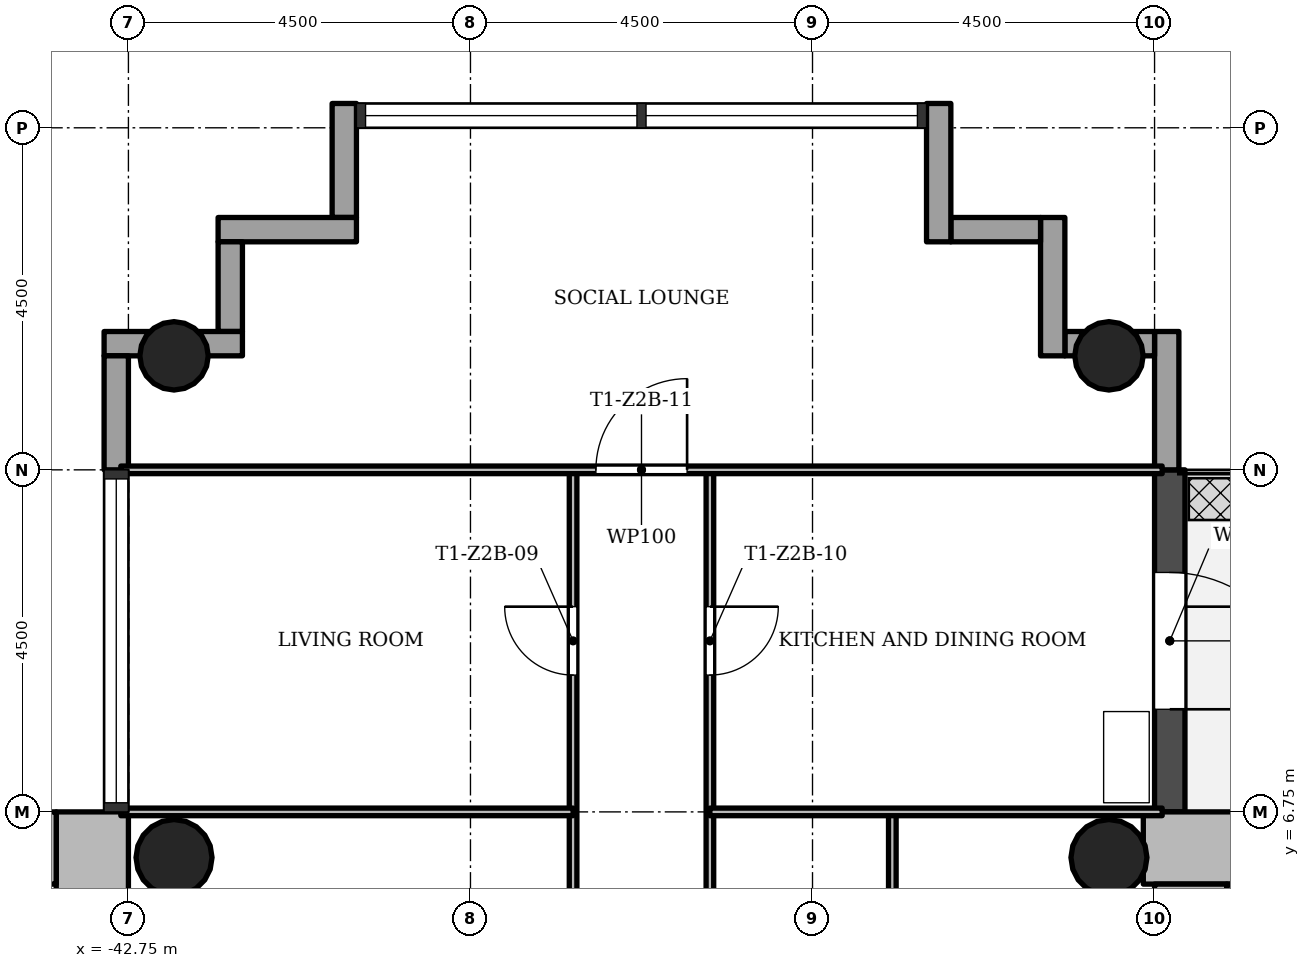
"""IFC4 building model, lengths in metres.
Left out: names, types, materials, properties, quantities, classifications, styles, units other than length and angle.
Written with IfcOpenShell. Run it as: python <this file> out.ifc"""

import sys

from ifc_helpers import new_model, si_unit, direction, frame, frame_2d, origin, origin_2d, place, context, subcontext, project, spatial, rectangle, hollow_circle, extrude, element, fill, save


model = new_model("IFC4")
c1 = context("Model", 3, precision=1e-05, world=origin(), true_north=direction((0.0, 1.0)))
c2 = subcontext(c1, "Body", "Model", "MODEL_VIEW")
j1 = project(units=[si_unit("LENGTHUNIT", "METRE"), si_unit("PLANEANGLEUNIT", "RADIAN")], contexts=[c1])
p1 = place(None, origin())
s1 = spatial("IfcSite", under=j1, at=p1, CompositionType="ELEMENT")
p2 = place(p1, origin())
s2 = spatial("IfcBuilding", under=s1, at=p2, CompositionType="ELEMENT")
p3 = place(p2, frame((0.0, 0.0, 83.4)))
s3 = spatial("IfcBuildingStorey", under=s2, at=p3, CompositionType="ELEMENT", Elevation=83.4)
p4 = place(p3, frame((-20.702, 6.275, 0.0), z_axis=(0.0, 0.0, 1.0), x_axis=(-1.0, 0.0, 0.0)))
e1 = element("IfcWall", 1, at=p4, inside=s3, PredefinedType="SHEAR", context=c2, shape_type="SweptSolid", body=[
    extrude(rectangle(XDim=8.696, YDim=0.95, at=frame_2d((4.348, 0.0))), origin(), (0.0, 0.0, 1.0), 3.4),
])
p5 = place(p3, frame((-28.775, 5.8, 0.0), z_axis=(0.0, 0.0, 1.0), x_axis=(0.0, -1.0, 0.0)))
e2 = element("IfcWall", 2, at=p5, inside=s3, PredefinedType="SHEAR", context=c2, shape_type="SweptSolid", body=[
    extrude(rectangle(XDim=12.55, YDim=0.95, at=frame_2d((6.275, 0.0))), origin(), (0.0, 0.0, 1.0), 3.4),
])
p6 = place(p5, frame((4.9, 0.0, 0.0)))
e3 = element("IfcOpeningElement", 3, at=p6, cuts=e2, PredefinedType="OPENING", context=c2, shape_type="SweptSolid", body=[
    extrude(rectangle(XDim=1.8, YDim=2.1, at=frame_2d((0.9, 1.05))), frame((0.0, 0.485, 0.0), z_axis=(0.0, -1.0, 0.0), x_axis=(1.0, 0.0, 0.0)), (0.0, 0.0, 1.0), 0.97),
])
p7 = place(p3, frame((-43.225, -5.8, 0.0), z_axis=(0.0, 0.0, 1.0), x_axis=(0.0, 1.0, 0.0)))
e4 = element("IfcWall", 4, at=p7, inside=s3, PredefinedType="SHEAR", context=c2, shape_type="SweptSolid", body=[
    extrude(rectangle(XDim=12.55, YDim=0.95, at=frame_2d((6.275, 0.0))), origin(), (0.0, 0.0, 1.0), 3.4),
])
p8 = place(p7, frame((4.9, 0.0, 0.0)))
e5 = element("IfcOpeningElement", 5, at=p8, cuts=e4, PredefinedType="OPENING", context=c2, shape_type="SweptSolid", body=[
    extrude(rectangle(XDim=1.8, YDim=2.1, at=frame_2d((0.9, 1.05))), frame((0.0, 0.485, 0.0), z_axis=(0.0, -1.0, 0.0), x_axis=(1.0, 0.0, 0.0)), (0.0, 0.0, 1.0), 0.97),
])
p9 = place(p3, frame((-43.7, 6.275, 0.0), z_axis=(0.0, 0.0, 1.0), x_axis=(-1.0, 0.0, 0.0)))
e6 = element("IfcWall", 6, at=p9, inside=s3, PredefinedType="SHEAR", context=c2, shape_type="SweptSolid", body=[
    extrude(rectangle(XDim=8.05, YDim=0.95, at=frame_2d((4.025, 0.0))), origin(), (0.0, 0.0, 1.0), 3.4),
])
for number, where, z_axis, x_axis in (
    (7, (-29.85, 12.75, 0.0), (0.0, 0.0, 1.0), (1.0, 0.0, 0.0)),
    (8, (-42.15, 12.75, 0.0), (0.0, 0.0, 1.0), (1.0, 0.0, 0.0)),
):
    element("IfcColumn", number, at=place(p3, frame(where, z_axis=z_axis, x_axis=x_axis)), inside=s3, PredefinedType="COLUMN", context=c2, shape_type="SweptSolid", body=[
        extrude(hollow_circle(Radius=0.45, WallThickness=0.032, at=origin_2d()), origin(), (0.0, 0.0, 1.0), 3.4),
    ])
for number, where, z_axis, x_axis in (
    (9, (-29.85, 6.15, 0.0), (0.0, 0.0, 1.0), (1.0, 0.0, 0.0)),
    (10, (-42.15, 6.15, 0.0), (0.0, 0.0, 1.0), (1.0, 0.0, 0.0)),
):
    element("IfcColumn", number, at=place(p3, frame(where, z_axis=z_axis, x_axis=x_axis)), inside=s3, PredefinedType="COLUMN", context=c2, shape_type="SweptSolid", body=[
        extrude(hollow_circle(Radius=0.5, WallThickness=0.036, at=origin_2d()), origin(), (0.0, 0.0, 1.0), 3.4),
    ])
p10 = place(p3, frame((-29.05, 6.75, -0.02), z_axis=(0.0, 0.0, 1.0), x_axis=(0.0, 1.0, 0.0)))
e11 = element("IfcWall", 11, at=p10, inside=s3, PredefinedType="STANDARD", context=c2, shape_type="SweptSolid", body=[
    extrude(rectangle(XDim=4.5, YDim=0.4, at=frame_2d((2.25, 0.0))), origin(), (0.0, 0.0, 1.0), 3.12),
])
p11 = place(p10, frame((1.35, 0.0, 0.02)))
e12 = element("IfcOpeningElement", 12, at=p11, cuts=e11, PredefinedType="OPENING", context=c2, shape_type="SweptSolid", body=[
    extrude(rectangle(XDim=1.8, YDim=2.1, at=frame_2d((0.9, 1.05))), frame((0.0, 0.21, 0.0), z_axis=(0.0, -1.0, 0.0), x_axis=(1.0, 0.0, 0.0)), (0.0, 0.0, 1.0), 0.42),
])
p12 = place(p3, frame((-29.09, 11.25, -0.3), z_axis=(0.0, 0.0, 1.0), x_axis=(0.0, 1.0, 0.0)))
e13 = element("IfcWall", 13, at=p12, inside=s3, PredefinedType="STANDARD", context=c2, shape_type="SweptSolid", body=[
    extrude(rectangle(XDim=1.82, YDim=0.32, at=frame_2d((0.91, 0.0))), origin(), (0.0, 0.0, 1.0), 3.4),
])
p13 = place(p3, frame((-29.25, 12.91, -0.3), z_axis=(0.0, 0.0, 1.0), x_axis=(-1.0, 0.0, 0.0)))
e14 = element("IfcWall", 14, at=p13, inside=s3, PredefinedType="STANDARD", context=c2, shape_type="SweptSolid", body=[
    extrude(rectangle(XDim=1.18, YDim=0.32, at=frame_2d((0.59, 0.0))), origin(), (0.0, 0.0, 1.0), 3.4),
])
p14 = place(p3, frame((-30.59, 12.75, -0.3), z_axis=(0.0, 0.0, 1.0), x_axis=(0.0, 1.0, 0.0)))
e15 = element("IfcWall", 15, at=p14, inside=s3, PredefinedType="STANDARD", context=c2, shape_type="SweptSolid", body=[
    extrude(rectangle(XDim=1.82, YDim=0.32, at=frame_2d((0.91, 0.0))), origin(), (0.0, 0.0, 1.0), 3.4),
])
p15 = place(p3, frame((-30.75, 14.41, -0.3), z_axis=(0.0, 0.0, 1.0), x_axis=(-1.0, 0.0, 0.0)))
e16 = element("IfcWall", 16, at=p15, inside=s3, PredefinedType="STANDARD", context=c2, shape_type="SweptSolid", body=[
    extrude(rectangle(XDim=1.18, YDim=0.32, at=frame_2d((0.59, 0.0))), origin(), (0.0, 0.0, 1.0), 3.4),
])
p16 = place(p3, frame((-32.09, 14.25, -0.3), z_axis=(0.0, 0.0, 1.0), x_axis=(0.0, 1.0, 0.0)))
e17 = element("IfcWall", 17, at=p16, inside=s3, PredefinedType="STANDARD", context=c2, shape_type="SweptSolid", body=[
    extrude(rectangle(XDim=1.82, YDim=0.32, at=frame_2d((0.91, 0.0))), origin(), (0.0, 0.0, 1.0), 3.4),
])
p17 = place(p3, frame((-39.91, 16.07, -0.3), z_axis=(0.0, 0.0, 1.0), x_axis=(0.0, -1.0, 0.0)))
e18 = element("IfcWall", 18, at=p17, inside=s3, PredefinedType="STANDARD", context=c2, shape_type="SweptSolid", body=[
    extrude(rectangle(XDim=1.5, YDim=0.32, at=frame_2d((0.75, 0.0))), origin(), (0.0, 0.0, 1.0), 3.4),
])
p18 = place(p3, frame((-39.75, 14.41, -0.3), z_axis=(0.0, 0.0, 1.0), x_axis=(-1.0, 0.0, 0.0)))
e19 = element("IfcWall", 19, at=p18, inside=s3, PredefinedType="STANDARD", context=c2, shape_type="SweptSolid", body=[
    extrude(rectangle(XDim=1.82, YDim=0.32, at=frame_2d((0.91, 0.0))), origin(), (0.0, 0.0, 1.0), 3.4),
])
p19 = place(p3, frame((-41.41, 14.25, -0.3), z_axis=(0.0, 0.0, 1.0), x_axis=(0.0, -1.0, 0.0)))
e20 = element("IfcWall", 20, at=p19, inside=s3, PredefinedType="STANDARD", context=c2, shape_type="SweptSolid", body=[
    extrude(rectangle(XDim=1.18, YDim=0.32, at=frame_2d((0.59, 0.0))), origin(), (0.0, 0.0, 1.0), 3.4),
])
p20 = place(p3, frame((-41.25, 12.91, -0.3), z_axis=(0.0, 0.0, 1.0), x_axis=(-1.0, 0.0, 0.0)))
e21 = element("IfcWall", 21, at=p20, inside=s3, PredefinedType="STANDARD", context=c2, shape_type="SweptSolid", body=[
    extrude(rectangle(XDim=1.82, YDim=0.32, at=frame_2d((0.91, 0.0))), origin(), (0.0, 0.0, 1.0), 3.4),
])
p21 = place(p3, frame((-42.91, 12.75, -0.3), z_axis=(0.0, 0.0, 1.0), x_axis=(0.0, -1.0, 0.0)))
e22 = element("IfcWall", 22, at=p21, inside=s3, PredefinedType="STANDARD", context=c2, shape_type="SweptSolid", body=[
    extrude(rectangle(XDim=1.5, YDim=0.32, at=frame_2d((0.75, 0.0))), origin(), (0.0, 0.0, 1.0), 3.4),
])
p22 = place(p3, frame((-36.9, 1.5, 0.0), z_axis=(0.0, 0.0, 1.0), x_axis=(0.0, 1.0, 0.0)))
e23 = element("IfcWall", 23, at=p22, inside=s3, PredefinedType="PARTITIONING", context=c2, shape_type="SweptSolid", body=[
    extrude(rectangle(XDim=9.75, YDim=0.1, at=frame_2d((4.875, 0.0))), origin(), (0.0, 0.0, 1.0), 3.0),
])
p23 = place(p22, frame((0.75, 0.0, 0.0)))
e24 = element("IfcOpeningElement", 24, at=p23, cuts=e23, PredefinedType="OPENING", context=c2, shape_type="SweptSolid", body=[
    extrude(rectangle(XDim=0.9, YDim=2.1, at=frame_2d((0.45, 1.05))), frame((0.0, 0.06, 0.0), z_axis=(0.0, -1.0, 0.0), x_axis=(1.0, 0.0, 0.0)), (0.0, 0.0, 1.0), 0.12),
])
p24 = place(p22, frame((7.05, 0.0, 0.0)))
e25 = element("IfcOpeningElement", 25, at=p24, cuts=e23, PredefinedType="OPENING", context=c2, shape_type="SweptSolid", body=[
    extrude(rectangle(XDim=0.9, YDim=2.1, at=frame_2d((0.45, 1.05))), frame((0.0, 0.06, 0.0), z_axis=(0.0, -1.0, 0.0), x_axis=(1.0, 0.0, 0.0)), (0.0, 0.0, 1.0), 0.12),
])
p25 = place(p3, frame((-35.1, 1.5, 0.0), z_axis=(0.0, 0.0, 1.0), x_axis=(0.0, 1.0, 0.0)))
e26 = element("IfcWall", 26, at=p25, inside=s3, PredefinedType="PARTITIONING", context=c2, shape_type="SweptSolid", body=[
    extrude(rectangle(XDim=9.75, YDim=0.1, at=frame_2d((4.875, 0.0))), origin(), (0.0, 0.0, 1.0), 3.0),
])
p26 = place(p25, frame((2.175, 0.0, 0.0)))
e27 = element("IfcOpeningElement", 27, at=p26, cuts=e26, PredefinedType="OPENING", context=c2, shape_type="SweptSolid", body=[
    extrude(rectangle(XDim=0.9, YDim=2.1, at=frame_2d((0.45, 1.05))), frame((0.0, 0.06, 0.0), z_axis=(0.0, -1.0, 0.0), x_axis=(1.0, 0.0, 0.0)), (0.0, 0.0, 1.0), 0.12),
])
p27 = place(p25, frame((7.05, 0.0, 0.0)))
e28 = element("IfcOpeningElement", 28, at=p27, cuts=e26, PredefinedType="OPENING", context=c2, shape_type="SweptSolid", body=[
    extrude(rectangle(XDim=0.9, YDim=2.1, at=frame_2d((0.45, 1.05))), frame((0.0, 0.06, 0.0), z_axis=(0.0, -1.0, 0.0), x_axis=(1.0, 0.0, 0.0)), (0.0, 0.0, 1.0), 0.12),
])
p28 = place(p3, frame((-32.7, 1.5, 0.0), z_axis=(0.0, 0.0, 1.0), x_axis=(0.0, 1.0, 0.0)))
e29 = element("IfcWall", 29, at=p28, inside=s3, PredefinedType="PARTITIONING", context=c2, shape_type="SweptSolid", body=[
    extrude(rectangle(XDim=5.25, YDim=0.1, at=frame_2d((2.625, 0.0))), origin(), (0.0, 0.0, 1.0), 3.0),
])
for number, where, z_axis, x_axis in (
    (30, (-42.85, 6.75, 0.0), (0.0, 0.0, 1.0), (1.0, 0.0, 0.0)),
    (31, (-35.1, 6.75, 0.0), (0.0, 0.0, 1.0), (1.0, 0.0, 0.0)),
):
    element("IfcWall", number, at=place(p3, frame(where, z_axis=z_axis, x_axis=x_axis)), inside=s3, PredefinedType="PARTITIONING", context=c2, shape_type="SweptSolid", body=[
        extrude(rectangle(XDim=5.95, YDim=0.1, at=frame_2d((2.975, 0.0))), origin(), (0.0, 0.0, 1.0), 3.0),
    ])
p29 = place(p3, frame((-42.85, 11.25, 0.0), z_axis=(0.0, 0.0, 1.0), x_axis=(1.0, 0.0, 0.0)))
e32 = element("IfcWall", 32, at=p29, inside=s3, PredefinedType="PARTITIONING", context=c2, shape_type="SweptSolid", body=[
    extrude(rectangle(XDim=13.7, YDim=0.1, at=frame_2d((6.85, 0.0))), origin(), (0.0, 0.0, 1.0), 3.0),
])
p30 = place(p29, frame((6.25, 0.0, 0.0)))
e33 = element("IfcOpeningElement", 33, at=p30, cuts=e32, PredefinedType="OPENING", context=c2, shape_type="SweptSolid", body=[
    extrude(rectangle(XDim=1.2, YDim=2.1, at=frame_2d((0.6, 1.05))), frame((0.0, 0.06, 0.0), z_axis=(0.0, -1.0, 0.0), x_axis=(1.0, 0.0, 0.0)), (0.0, 0.0, 1.0), 0.12),
])
p31 = place(p3, frame((-28.175, 1.9, 0.0), z_axis=(0.0, 0.0, 1.0), x_axis=(0.0, 1.0, 0.0)))
e34 = element("IfcWall", 34, at=p31, inside=s3, PredefinedType="SHEAR", context=c2, shape_type="SweptSolid", body=[
    extrude(rectangle(XDim=3.9, YDim=0.25, at=frame_2d((1.95, 0.0))), origin(), (0.0, 0.0, 1.0), 3.4),
])
p32 = place(p11, origin())
e35 = element("IfcDoor", 35, at=p32, inside=s3, OperationType="SINGLE_SWING_LEFT", PredefinedType="DOOR", context=c2, shape_type="SweptSolid", body=[
    extrude(rectangle(XDim=1.8, YDim=2.1, at=frame_2d((0.9, 1.05))), frame((0.0, 0.025, 0.0), z_axis=(0.0, -1.0, 0.0), x_axis=(1.0, 0.0, 0.0)), (0.0, 0.0, 1.0), 0.05),
])
fill(e12, e35)
p33 = place(p24, origin())
e36 = element("IfcDoor", 36, at=p33, inside=s3, OperationType="SINGLE_SWING_LEFT", PredefinedType="DOOR", context=c2, shape_type="SweptSolid", body=[
    extrude(rectangle(XDim=0.9, YDim=2.1, at=frame_2d((0.45, 1.05))), frame((0.0, 0.025, 0.0), z_axis=(0.0, -1.0, 0.0), x_axis=(1.0, 0.0, 0.0)), (0.0, 0.0, 1.0), 0.05),
])
fill(e25, e36)
p34 = place(p27, origin())
e37 = element("IfcDoor", 37, at=p34, inside=s3, OperationType="SINGLE_SWING_RIGHT", PredefinedType="DOOR", context=c2, shape_type="SweptSolid", body=[
    extrude(rectangle(XDim=0.9, YDim=2.1, at=frame_2d((0.45, 1.05))), frame((0.0, 0.025, 0.0), z_axis=(0.0, -1.0, 0.0), x_axis=(1.0, 0.0, 0.0)), (0.0, 0.0, 1.0), 0.05),
])
fill(e28, e37)
p35 = place(p30, origin())
e38 = element("IfcDoor", 38, at=p35, inside=s3, OperationType="SINGLE_SWING_LEFT", PredefinedType="DOOR", context=c2, shape_type="SweptSolid", body=[
    extrude(rectangle(XDim=1.2, YDim=2.1, at=frame_2d((0.6, 1.05))), frame((0.0, 0.025, 0.0), z_axis=(0.0, -1.0, 0.0), x_axis=(1.0, 0.0, 0.0)), (0.0, 0.0, 1.0), 0.05),
])
fill(e33, e38)
save(model, sys.argv[1])
